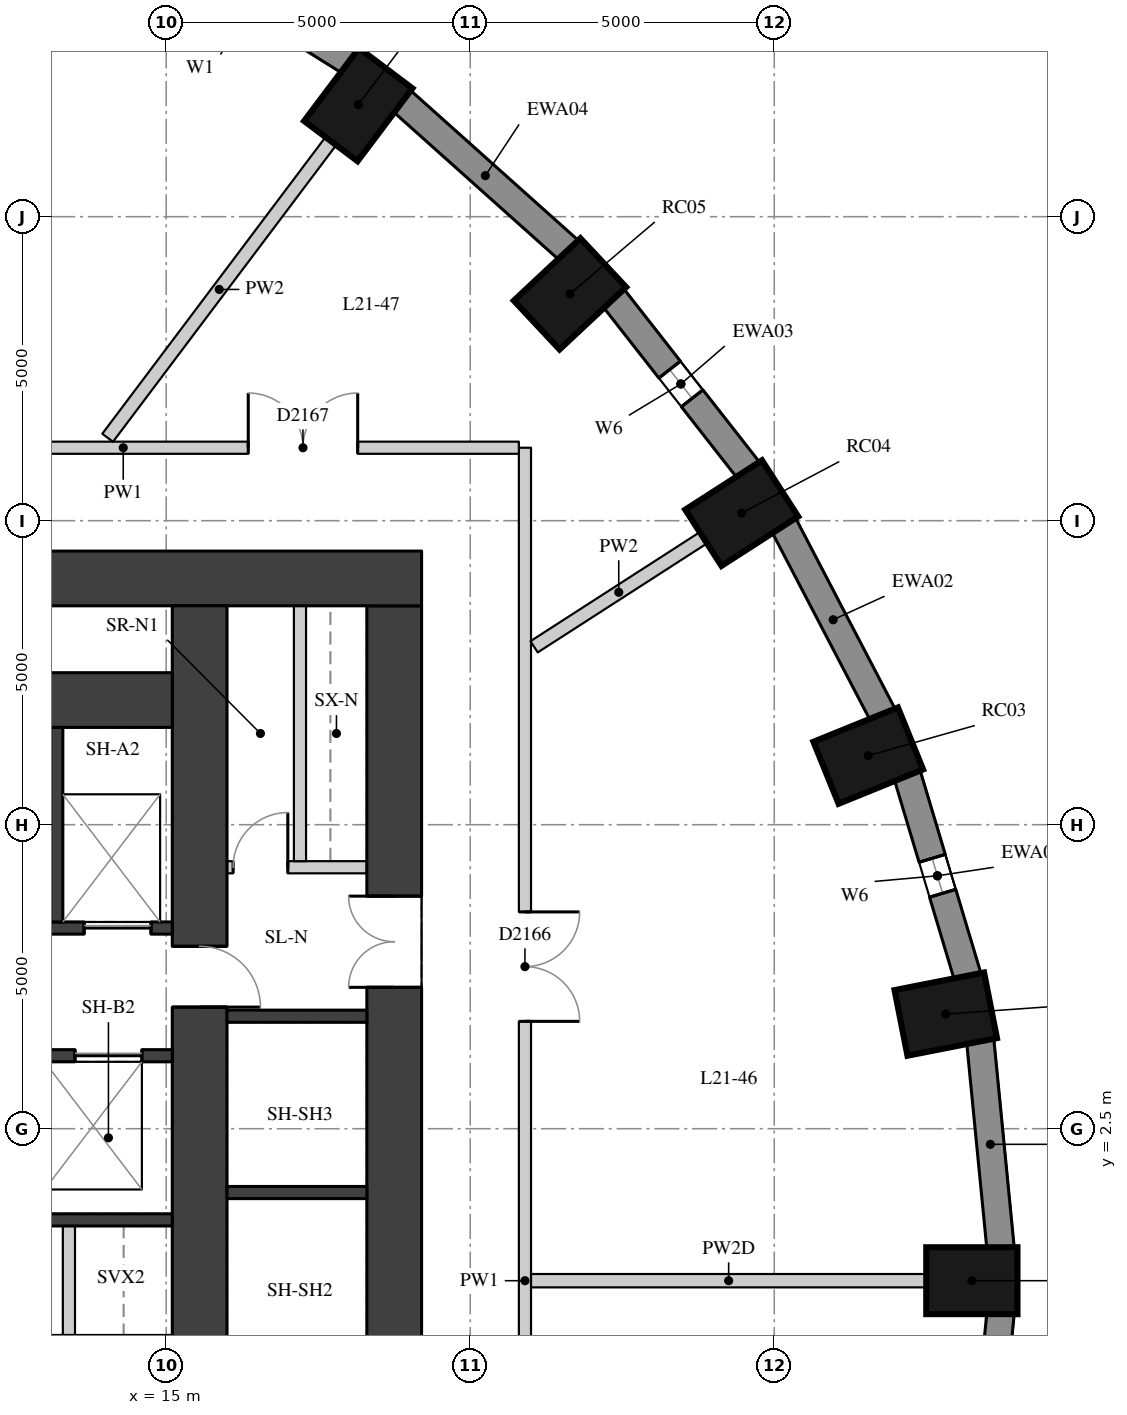
"""IFC4 building model, lengths in metres.
Left out: names, types, materials, properties, quantities, classifications, styles, units other than length and angle.
Written with IfcOpenShell. Run it as: python <this file> out.ifc"""

import sys

from ifc_helpers import new_model, si_unit, direction, frame, frame_2d, origin, origin_2d, place, context, subcontext, project, spatial, rectangle, extrude, element, fill, save


model = new_model("IFC4")
c1 = context("Model", 3, precision=1e-05, world=origin(), true_north=direction((0.0, 1.0)))
c2 = subcontext(c1, "Body", "Model", "MODEL_VIEW")
j1 = project(units=[si_unit("LENGTHUNIT", "METRE"), si_unit("PLANEANGLEUNIT", "RADIAN")], contexts=[c1])
p1 = place(None, origin())
s1 = spatial("IfcSite", under=j1, at=p1, CompositionType="ELEMENT")
p2 = place(p1, origin())
s2 = spatial("IfcBuilding", under=s1, at=p2, CompositionType="ELEMENT")
p3 = place(p2, frame((0.0, 0.0, 77.8)))
s3 = spatial("IfcBuildingStorey", under=s2, at=p3, CompositionType="ELEMENT", Elevation=77.8)
for number, where, z_axis, x_axis in (
    (1, (28.25, 0.0, 0.0), (0.0, 0.0, 1.0), (1.0, 0.0, 0.0)),
    (2, (27.821, 4.385, 0.0), (0.0, 0.0, 1.0), (0.981, 0.193, 0.0)),
    (3, (26.546, 8.636, 0.0), (0.0, 0.0, 1.0), (0.927, 0.376, 0.0)),
    (4, (24.465, 12.625, 0.0), (0.0, 0.0, 1.0), (0.841, 0.541, 0.0)),
    (5, (21.641, 16.23, 0.0), (0.0, 0.0, 1.0), (0.73, 0.683, 0.0)),
    (6, (18.159, 19.343, 0.0), (0.0, 0.0, 1.0), (0.601, 0.799, 0.0)),
):
    element("IfcColumn", number, at=place(p3, frame(where, z_axis=z_axis, x_axis=x_axis)), inside=s3, PredefinedType="COLUMN", context=c2, shape_type="SweptSolid", body=[
        extrude(rectangle(XDim=1.5, YDim=1.1, at=origin_2d()), origin(), (0.0, 0.0, 1.0), 3.3),
    ])
p4 = place(p3, frame((28.722, 0.53, 0.0), z_axis=(0.0, 0.0, 1.0), x_axis=(-0.097389581596, 0.995246336038, 0.0)))
e7 = element("IfcWall", 7, at=p4, inside=s3, PredefinedType="SOLIDWALL", context=c2, shape_type="SweptSolid", body=[
    extrude(rectangle(XDim=3.442, YDim=0.45, at=frame_2d((1.721, 0.0))), origin(), (0.0, 0.0, 1.0), 3.02),
])
p5 = place(p3, frame((28.182, 4.996, 0.0), z_axis=(0.0, 0.0, 1.0), x_axis=(-0.287064133733, 0.957911364963, 0.0)))
e8 = element("IfcWall", 8, at=p5, inside=s3, PredefinedType="SOLIDWALL", context=c2, shape_type="SweptSolid", body=[
    extrude(rectangle(XDim=3.473, YDim=0.45, at=frame_2d((1.737, 0.0))), origin(), (0.0, 0.0, 1.0), 3.02),
])
p6 = place(p5, frame((1.437, 0.0, 0.4)))
e9 = element("IfcOpeningElement", 9, at=p6, cuts=e8, PredefinedType="OPENING", context=c2, shape_type="SweptSolid", body=[
    extrude(rectangle(XDim=0.6, YDim=1.75, at=frame_2d((0.3, 0.875))), frame((0.0, 0.235, 0.0), z_axis=(0.0, -1.0, 0.0), x_axis=(1.0, 0.0, 0.0)), (0.0, 0.0, 1.0), 0.47),
])
p7 = place(p3, frame((26.786, 9.305, 0.0), z_axis=(0.0, 0.0, 1.0), x_axis=(-0.462492775226, 0.886623050041, 0.0)))
e10 = element("IfcWall", 10, at=p7, inside=s3, PredefinedType="SOLIDWALL", context=c2, shape_type="SweptSolid", body=[
    extrude(rectangle(XDim=3.532, YDim=0.45, at=frame_2d((1.766, 0.0))), origin(), (0.0, 0.0, 1.0), 3.02),
])
p8 = place(p3, frame((24.578, 13.328, 0.0), z_axis=(0.0, 0.0, 1.0), x_axis=(-0.616661975264, 0.787228053529, 0.0)))
e11 = element("IfcWall", 11, at=p8, inside=s3, PredefinedType="SOLIDWALL", context=c2, shape_type="SweptSolid", body=[
    extrude(rectangle(XDim=3.61, YDim=0.45, at=frame_2d((1.805, 0.0))), origin(), (0.0, 0.0, 1.0), 3.02),
])
p9 = place(p8, frame((1.505, 0.0, 0.4)))
e12 = element("IfcOpeningElement", 12, at=p9, cuts=e11, PredefinedType="OPENING", context=c2, shape_type="SweptSolid", body=[
    extrude(rectangle(XDim=0.6, YDim=1.75, at=frame_2d((0.3, 0.875))), frame((0.0, 0.235, 0.0), z_axis=(0.0, -1.0, 0.0), x_axis=(1.0, 0.0, 0.0)), (0.0, 0.0, 1.0), 0.47),
])
p10 = place(p3, frame((21.627, 16.943, 0.0), z_axis=(0.0, 0.0, 1.0), x_axis=(-0.745526233716, 0.66647628228, 0.0)))
e13 = element("IfcWall", 13, at=p10, inside=s3, PredefinedType="SOLIDWALL", context=c2, shape_type="SweptSolid", body=[
    extrude(rectangle(XDim=3.697, YDim=0.45, at=frame_2d((1.848, 0.0))), origin(), (0.0, 0.0, 1.0), 3.02),
])
p11 = place(p3, frame((18.023, 20.044, 0.0), z_axis=(0.0, 0.0, 1.0), x_axis=(-0.847635480093, 0.530579016629, 0.0)))
e14 = element("IfcWall", 14, at=p11, inside=s3, PredefinedType="SOLIDWALL", context=c2, shape_type="SweptSolid", body=[
    extrude(rectangle(XDim=3.782, YDim=0.45, at=frame_2d((1.891, 0.0))), origin(), (0.0, 0.0, 1.0), 3.02),
])
p12 = place(p11, frame((0.791, 0.0, 0.4)))
e15 = element("IfcOpeningElement", 15, at=p12, cuts=e14, PredefinedType="OPENING", context=c2, shape_type="SweptSolid", body=[
    extrude(rectangle(XDim=2.2, YDim=1.75, at=frame_2d((1.1, 0.875))), frame((0.0, 0.235, 0.0), z_axis=(0.0, -1.0, 0.0), x_axis=(1.0, 0.0, 0.0)), (0.0, 0.0, 1.0), 0.47),
])
p13 = place(p3, frame((28.387, -3.956, 0.0), z_axis=(0.0, 0.0, 1.0), x_axis=(0.097389581596, 0.995246336038, 0.0)))
e16 = element("IfcWall", 16, at=p13, inside=s3, PredefinedType="SOLIDWALL", context=c2, shape_type="SweptSolid", body=[
    extrude(rectangle(XDim=3.442, YDim=0.45, at=frame_2d((1.721, 0.0))), origin(), (0.0, 0.0, 1.0), 3.02),
])
p14 = place(p13, frame((1.421, 0.0, 0.4)))
e17 = element("IfcOpeningElement", 17, at=p14, cuts=e16, PredefinedType="OPENING", context=c2, shape_type="SweptSolid", body=[
    extrude(rectangle(XDim=0.6, YDim=1.75, at=frame_2d((0.3, 0.875))), frame((0.0, 0.235, 0.0), z_axis=(0.0, -1.0, 0.0), x_axis=(1.0, 0.0, 0.0)), (0.0, 0.0, 1.0), 0.47),
])
p15 = place(p3, frame((18.75, -11.1, 0.0), z_axis=(0.0, 0.0, 1.0), x_axis=(0.0, 1.0, 0.0)))
e18 = element("IfcWall", 18, at=p15, inside=s3, PredefinedType="SHEAR", context=c2, shape_type="SweptSolid", body=[
    extrude(rectangle(XDim=22.2, YDim=0.9, at=frame_2d((11.1, 0.0))), origin(), (0.0, 0.0, 1.0), 3.02),
])
p16 = place(p15, frame((15.925, 0.0, 0.0)))
e19 = element("IfcOpeningElement", 19, at=p16, cuts=e18, PredefinedType="OPENING", context=c2, shape_type="SweptSolid", body=[
    extrude(rectangle(XDim=1.5, YDim=2.1, at=frame_2d((0.75, 1.05))), frame((0.0, 0.46, 0.0), z_axis=(0.0, -1.0, 0.0), x_axis=(1.0, 0.0, 0.0)), (0.0, 0.0, 1.0), 0.92),
])
p17 = place(p15, frame((4.525, 0.0, 0.0)))
e20 = element("IfcOpeningElement", 20, at=p17, cuts=e18, PredefinedType="OPENING", context=c2, shape_type="SweptSolid", body=[
    extrude(rectangle(XDim=1.5, YDim=2.1, at=frame_2d((0.75, 1.05))), frame((0.0, 0.46, 0.0), z_axis=(0.0, -1.0, 0.0), x_axis=(1.0, 0.0, 0.0)), (0.0, 0.0, 1.0), 0.92),
])
p18 = place(p3, frame((4.0, 11.55, 0.0), z_axis=(0.0, 0.0, 1.0), x_axis=(1.0, 0.0, 0.0)))
e21 = element("IfcWall", 21, at=p18, inside=s3, PredefinedType="SHEAR", context=c2, shape_type="SweptSolid", body=[
    extrude(rectangle(XDim=15.2, YDim=0.9, at=frame_2d((7.6, 0.0))), origin(), (0.0, 0.0, 1.0), 3.02),
])
p19 = place(p3, frame((15.55, -11.1, 0.0), z_axis=(0.0, 0.0, 1.0), x_axis=(0.0, 1.0, 0.0)))
e22 = element("IfcWall", 22, at=p19, inside=s3, PredefinedType="SHEAR", context=c2, shape_type="SweptSolid", body=[
    extrude(rectangle(XDim=22.2, YDim=0.9, at=frame_2d((11.1, 0.0))), origin(), (0.0, 0.0, 1.0), 3.02),
])
p20 = place(p19, frame((15.6, 0.0, 0.0)))
e23 = element("IfcOpeningElement", 23, at=p20, cuts=e22, PredefinedType="OPENING", context=c2, shape_type="SweptSolid", body=[
    extrude(rectangle(XDim=1.0, YDim=2.1, at=frame_2d((0.5, 1.05))), frame((0.0, 0.46, 0.0), z_axis=(0.0, -1.0, 0.0), x_axis=(1.0, 0.0, 0.0)), (0.0, 0.0, 1.0), 0.92),
])
p21 = place(p19, frame((5.6, 0.0, 0.0)))
e24 = element("IfcOpeningElement", 24, at=p21, cuts=e22, PredefinedType="OPENING", context=c2, shape_type="SweptSolid", body=[
    extrude(rectangle(XDim=1.0, YDim=2.1, at=frame_2d((0.5, 1.05))), frame((0.0, 0.46, 0.0), z_axis=(0.0, -1.0, 0.0), x_axis=(1.0, 0.0, 0.0)), (0.0, 0.0, 1.0), 0.92),
])
p22 = place(p3, frame((4.9, 9.55, 0.0), z_axis=(0.0, 0.0, 1.0), x_axis=(1.0, 0.0, 0.0)))
e25 = element("IfcWall", 25, at=p22, inside=s3, PredefinedType="SHEAR", context=c2, shape_type="SweptSolid", body=[
    extrude(rectangle(XDim=10.2, YDim=0.9, at=frame_2d((5.1, 0.0))), origin(), (0.0, 0.0, 1.0), 3.02),
])
p23 = place(p3, frame((4.9, 5.8, 0.0), z_axis=(0.0, 0.0, 1.0), x_axis=(1.0, 0.0, 0.0)))
e26 = element("IfcWall", 26, at=p23, inside=s3, PredefinedType="SHEAR", context=c2, shape_type="SweptSolid", body=[
    extrude(rectangle(XDim=10.2, YDim=0.2, at=frame_2d((5.1, 0.0))), origin(), (0.0, 0.0, 1.0), 3.02),
])
p24 = place(p23, frame((6.75, 0.0, 0.0)))
e27 = element("IfcOpeningElement", 27, at=p24, cuts=e26, PredefinedType="OPENING", context=c2, shape_type="SweptSolid", body=[
    extrude(rectangle(XDim=1.1, YDim=2.1, at=frame_2d((0.55, 1.05))), frame((0.0, 0.11, 0.0), z_axis=(0.0, -1.0, 0.0), x_axis=(1.0, 0.0, 0.0)), (0.0, 0.0, 1.0), 0.22),
])
p25 = place(p23, frame((8.75, 0.0, 0.0)))
e28 = element("IfcOpeningElement", 28, at=p25, cuts=e26, PredefinedType="OPENING", context=c2, shape_type="SweptSolid", body=[
    extrude(rectangle(XDim=1.1, YDim=2.1, at=frame_2d((0.55, 1.05))), frame((0.0, 0.11, 0.0), z_axis=(0.0, -1.0, 0.0), x_axis=(1.0, 0.0, 0.0)), (0.0, 0.0, 1.0), 0.22),
])
p26 = place(p3, frame((4.9, 3.7, 0.0), z_axis=(0.0, 0.0, 1.0), x_axis=(1.0, 0.0, 0.0)))
e29 = element("IfcWall", 29, at=p26, inside=s3, PredefinedType="SHEAR", context=c2, shape_type="SweptSolid", body=[
    extrude(rectangle(XDim=10.2, YDim=0.2, at=frame_2d((5.1, 0.0))), origin(), (0.0, 0.0, 1.0), 3.02),
])
p27 = place(p26, frame((6.3, 0.0, 0.0)))
e30 = element("IfcOpeningElement", 30, at=p27, cuts=e29, PredefinedType="OPENING", context=c2, shape_type="SweptSolid", body=[
    extrude(rectangle(XDim=1.1, YDim=2.1, at=frame_2d((0.55, 1.05))), frame((0.0, 0.11, 0.0), z_axis=(0.0, -1.0, 0.0), x_axis=(1.0, 0.0, 0.0)), (0.0, 0.0, 1.0), 0.22),
])
p28 = place(p26, frame((8.6, 0.0, 0.0)))
e31 = element("IfcOpeningElement", 31, at=p28, cuts=e29, PredefinedType="OPENING", context=c2, shape_type="SweptSolid", body=[
    extrude(rectangle(XDim=1.1, YDim=2.1, at=frame_2d((0.55, 1.05))), frame((0.0, 0.11, 0.0), z_axis=(0.0, -1.0, 0.0), x_axis=(1.0, 0.0, 0.0)), (0.0, 0.0, 1.0), 0.22),
])
p29 = place(p3, frame((4.9, 1.0, 0.0), z_axis=(0.0, 0.0, 1.0), x_axis=(1.0, 0.0, 0.0)))
e32 = element("IfcWall", 32, at=p29, inside=s3, PredefinedType="SHEAR", context=c2, shape_type="SweptSolid", body=[
    extrude(rectangle(XDim=10.2, YDim=0.2, at=frame_2d((5.1, 0.0))), origin(), (0.0, 0.0, 1.0), 3.02),
])
p30 = place(p3, frame((13.2, 5.9, 0.0), z_axis=(0.0, 0.0, 1.0), x_axis=(0.0, 1.0, 0.0)))
e33 = element("IfcWall", 33, at=p30, inside=s3, PredefinedType="SHEAR", context=c2, shape_type="SweptSolid", body=[
    extrude(rectangle(XDim=3.2, YDim=0.2, at=frame_2d((1.6, 0.0))), origin(), (0.0, 0.0, 1.0), 3.02),
])
p31 = place(p3, frame((13.4, -0.9, 0.0), z_axis=(0.0, 0.0, 1.0), x_axis=(0.0, 1.0, 0.0)))
e34 = element("IfcWall", 34, at=p31, inside=s3, PredefinedType="PARTITIONING", context=c2, shape_type="SweptSolid", body=[
    extrude(rectangle(XDim=1.8, YDim=0.2, at=frame_2d((0.9, 0.0))), origin(), (0.0, 0.0, 1.0), 3.02),
])
for number, where, z_axis, x_axis in (
    (35, (16.0, 1.45, 0.0), (0.0, 0.0, 1.0), (1.0, 0.0, 0.0)),
    (36, (16.0, 4.35, 0.0), (0.0, 0.0, 1.0), (1.0, 0.0, 0.0)),
):
    element("IfcWall", number, at=place(p3, frame(where, z_axis=z_axis, x_axis=x_axis)), inside=s3, PredefinedType="SHEAR", context=c2, shape_type="SweptSolid", body=[
        extrude(rectangle(XDim=2.3, YDim=0.2, at=frame_2d((1.15, 0.0))), origin(), (0.0, 0.0, 1.0), 3.02),
    ])
p32 = place(p3, frame((16.0, 6.8, 0.0), z_axis=(0.0, 0.0, 1.0), x_axis=(1.0, 0.0, 0.0)))
e37 = element("IfcWall", 37, at=p32, inside=s3, PredefinedType="PARTITIONING", context=c2, shape_type="SweptSolid", body=[
    extrude(rectangle(XDim=2.3, YDim=0.2, at=frame_2d((1.15, 0.0))), origin(), (0.0, 0.0, 1.0), 3.02),
])
p33 = place(p32, frame((0.1, 0.0, 0.0)))
e38 = element("IfcOpeningElement", 38, at=p33, cuts=e37, PredefinedType="OPENING", context=c2, shape_type="SweptSolid", body=[
    extrude(rectangle(XDim=0.9, YDim=2.1, at=frame_2d((0.45, 1.05))), frame((0.0, 0.11, 0.0), z_axis=(0.0, -1.0, 0.0), x_axis=(1.0, 0.0, 0.0)), (0.0, 0.0, 1.0), 0.22),
])
p34 = place(p3, frame((17.2, 6.9, 0.0), z_axis=(0.0, 0.0, 1.0), x_axis=(0.0, 1.0, 0.0)))
e39 = element("IfcWall", 39, at=p34, inside=s3, PredefinedType="PARTITIONING", context=c2, shape_type="SweptSolid", body=[
    extrude(rectangle(XDim=4.2, YDim=0.2, at=frame_2d((2.1, 0.0))), origin(), (0.0, 0.0, 1.0), 3.02),
])
p35 = place(p3, frame((20.9, 13.7, 0.0), z_axis=(0.0, 0.0, 1.0), x_axis=(0.0, -1.0, 0.0)))
e40 = element("IfcWall", 40, at=p35, inside=s3, PredefinedType="PARTITIONING", context=c2, shape_type="SweptSolid", body=[
    extrude(rectangle(XDim=27.4, YDim=0.2, at=frame_2d((13.7, 0.0))), origin(), (0.0, 0.0, 1.0), 3.02),
])
p36 = place(p35, frame((16.523, 0.0, 0.0)))
e41 = element("IfcOpeningElement", 41, at=p36, cuts=e40, PredefinedType="OPENING", context=c2, shape_type="SweptSolid", body=[
    extrude(rectangle(XDim=0.9, YDim=2.1, at=frame_2d((0.45, 1.05))), frame((0.0, 0.11, 0.0), z_axis=(0.0, -1.0, 0.0), x_axis=(1.0, 0.0, 0.0)), (0.0, 0.0, 1.0), 0.22),
])
p37 = place(p35, frame((7.635, 0.0, 0.0)))
e42 = element("IfcOpeningElement", 42, at=p37, cuts=e40, PredefinedType="OPENING", context=c2, shape_type="SweptSolid", body=[
    extrude(rectangle(XDim=1.8, YDim=2.1, at=frame_2d((0.9, 1.05))), frame((0.0, 0.11, 0.0), z_axis=(0.0, -1.0, 0.0), x_axis=(1.0, 0.0, 0.0)), (0.0, 0.0, 1.0), 0.22),
])
p38 = place(p3, frame((7.787, 13.7, 0.0), z_axis=(0.0, 0.0, 1.0), x_axis=(1.0, 0.0, 0.0)))
e43 = element("IfcWall", 43, at=p38, inside=s3, PredefinedType="PARTITIONING", context=c2, shape_type="SweptSolid", body=[
    extrude(rectangle(XDim=13.013, YDim=0.2, at=frame_2d((6.506, 0.0))), origin(), (0.0, 0.0, 1.0), 3.02),
])
p39 = place(p38, frame((1.583, 0.0, 0.0)))
e44 = element("IfcOpeningElement", 44, at=p39, cuts=e43, PredefinedType="OPENING", context=c2, shape_type="SweptSolid", body=[
    extrude(rectangle(XDim=1.1, YDim=2.1, at=frame_2d((0.55, 1.05))), frame((0.0, 0.11, 0.0), z_axis=(0.0, -1.0, 0.0), x_axis=(1.0, 0.0, 0.0)), (0.0, 0.0, 1.0), 0.22),
])
p40 = place(p38, frame((8.562, 0.0, 0.0)))
e45 = element("IfcOpeningElement", 45, at=p40, cuts=e43, PredefinedType="OPENING", context=c2, shape_type="SweptSolid", body=[
    extrude(rectangle(XDim=1.8, YDim=2.1, at=frame_2d((0.9, 1.05))), frame((0.0, 0.11, 0.0), z_axis=(0.0, -1.0, 0.0), x_axis=(1.0, 0.0, 0.0)), (0.0, 0.0, 1.0), 0.22),
])
p41 = place(p3, frame((27.5, 0.0, 0.0), z_axis=(0.0, 0.0, 1.0), x_axis=(-1.0, 0.0, 0.0)))
e46 = element("IfcWall", 46, at=p41, inside=s3, PredefinedType="PARTITIONING", context=c2, shape_type="SweptSolid", body=[
    extrude(rectangle(XDim=6.5, YDim=0.22, at=frame_2d((3.25, 0.0))), origin(), (0.0, 0.0, 1.0), 2.47),
])
p42 = place(p3, frame((23.835, 12.219, 0.0), z_axis=(0.0, 0.0, 1.0), x_axis=(-0.840713483419, -0.541480229368, 0.0)))
e47 = element("IfcWall", 47, at=p42, inside=s3, PredefinedType="PARTITIONING", context=c2, shape_type="SweptSolid", body=[
    extrude(rectangle(XDim=3.312, YDim=0.22, at=frame_2d((1.656, 0.0))), origin(), (0.0, 0.0, 1.0), 3.02),
])
p43 = place(p3, frame((17.708, 18.743, 0.0), z_axis=(0.0, 0.0, 1.0), x_axis=(-0.601170031872, -0.799121137738, 0.0)))
e48 = element("IfcWall", 48, at=p43, inside=s3, PredefinedType="PARTITIONING", context=c2, shape_type="SweptSolid", body=[
    extrude(rectangle(XDim=6.106, YDim=0.22, at=frame_2d((3.053, 0.0))), origin(), (0.0, 0.0, 1.0), 3.02),
])
p44 = place(p6, origin())
e49 = element("IfcWindow", 49, at=p44, inside=s3, PartitioningType="SINGLE_PANEL", PredefinedType="WINDOW", context=c2, shape_type="SweptSolid", body=[
    extrude(rectangle(XDim=0.6, YDim=1.75, at=frame_2d((0.3, 0.875))), frame((0.0, 0.035, 0.0), z_axis=(0.0, -1.0, 0.0), x_axis=(1.0, 0.0, 0.0)), (0.0, 0.0, 1.0), 0.06),
])
fill(e9, e49)
p45 = place(p9, origin())
e50 = element("IfcWindow", 50, at=p45, inside=s3, PartitioningType="SINGLE_PANEL", PredefinedType="WINDOW", context=c2, shape_type="SweptSolid", body=[
    extrude(rectangle(XDim=0.6, YDim=1.75, at=frame_2d((0.3, 0.875))), frame((0.0, 0.035, 0.0), z_axis=(0.0, -1.0, 0.0), x_axis=(1.0, 0.0, 0.0)), (0.0, 0.0, 1.0), 0.06),
])
fill(e12, e50)
p46 = place(p16, origin())
e51 = element("IfcDoor", 51, at=p46, inside=s3, OperationType="DOUBLE_DOOR_SINGLE_SWING", PredefinedType="DOOR", context=c2, shape_type="SweptSolid", body=[
    extrude(rectangle(XDim=1.5, YDim=2.1, at=frame_2d((0.75, 1.05))), frame((0.0, 0.025, 0.0), z_axis=(0.0, -1.0, 0.0), x_axis=(1.0, 0.0, 0.0)), (0.0, 0.0, 1.0), 0.05),
])
fill(e19, e51)
p47 = place(p25, origin())
e52 = element("IfcDoor", 52, at=p47, inside=s3, OperationType="DOUBLE_DOOR_SLIDING", PredefinedType="DOOR", context=c2, shape_type="SweptSolid", body=[
    extrude(rectangle(XDim=1.1, YDim=2.1, at=frame_2d((0.55, 1.05))), frame((0.0, 0.025, 0.0), z_axis=(0.0, -1.0, 0.0), x_axis=(1.0, 0.0, 0.0)), (0.0, 0.0, 1.0), 0.05),
])
fill(e28, e52)
p48 = place(p28, origin())
e53 = element("IfcDoor", 53, at=p48, inside=s3, OperationType="DOUBLE_DOOR_SLIDING", PredefinedType="DOOR", context=c2, shape_type="SweptSolid", body=[
    extrude(rectangle(XDim=1.1, YDim=2.1, at=frame_2d((0.55, 1.05))), frame((0.0, 0.025, 0.0), z_axis=(0.0, -1.0, 0.0), x_axis=(1.0, 0.0, 0.0)), (0.0, 0.0, 1.0), 0.05),
])
fill(e31, e53)
p49 = place(p20, origin())
e54 = element("IfcDoor", 54, at=p49, inside=s3, OperationType="SINGLE_SWING_RIGHT", PredefinedType="DOOR", context=c2, shape_type="SweptSolid", body=[
    extrude(rectangle(XDim=1.0, YDim=2.1, at=frame_2d((0.5, 1.05))), frame((0.0, 0.025, 0.0), z_axis=(0.0, -1.0, 0.0), x_axis=(1.0, 0.0, 0.0)), (0.0, 0.0, 1.0), 0.05),
])
fill(e23, e54)
p50 = place(p33, origin())
e55 = element("IfcDoor", 55, at=p50, inside=s3, OperationType="SINGLE_SWING_RIGHT", PredefinedType="DOOR", context=c2, shape_type="SweptSolid", body=[
    extrude(rectangle(XDim=0.9, YDim=2.1, at=frame_2d((0.45, 1.05))), frame((0.0, 0.025, 0.0), z_axis=(0.0, -1.0, 0.0), x_axis=(1.0, 0.0, 0.0)), (0.0, 0.0, 1.0), 0.05),
])
fill(e38, e55)
p51 = place(p37, origin())
e56 = element("IfcDoor", 56, at=p51, inside=s3, OperationType="DOUBLE_DOOR_SINGLE_SWING", PredefinedType="DOOR", context=c2, shape_type="SweptSolid", body=[
    extrude(rectangle(XDim=1.8, YDim=2.1, at=frame_2d((0.9, 1.05))), frame((0.0, 0.025, 0.0), z_axis=(0.0, -1.0, 0.0), x_axis=(1.0, 0.0, 0.0)), (0.0, 0.0, 1.0), 0.05),
])
fill(e42, e56)
p52 = place(p40, origin())
e57 = element("IfcDoor", 57, at=p52, inside=s3, OperationType="DOUBLE_DOOR_SINGLE_SWING", PredefinedType="DOOR", context=c2, shape_type="SweptSolid", body=[
    extrude(rectangle(XDim=1.8, YDim=2.1, at=frame_2d((0.9, 1.05))), frame((0.0, 0.025, 0.0), z_axis=(0.0, -1.0, 0.0), x_axis=(1.0, 0.0, 0.0)), (0.0, 0.0, 1.0), 0.05),
])
fill(e45, e57)
save(model, sys.argv[1])
